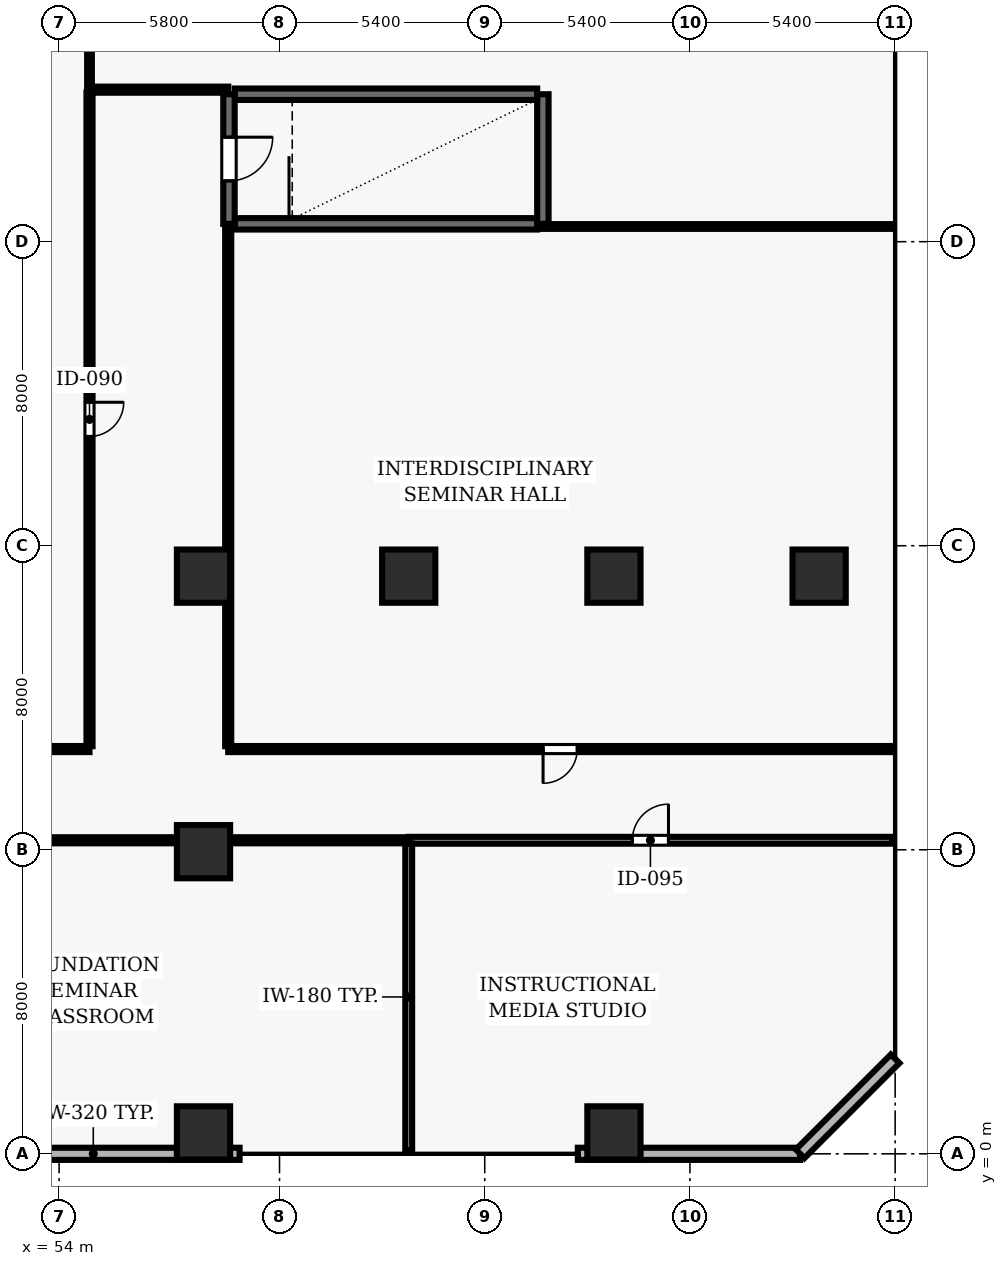
"""IFC4 building model, lengths in metres.
Left out: names, types, materials, properties, quantities, classifications, styles, units other than length and angle.
Written with IfcOpenShell. Run it as: python <this file> out.ifc"""

import sys

from ifc_helpers import new_model, si_unit, direction, frame, frame_2d, origin, origin_2d, place, context, subcontext, project, spatial, rectangle, extrude, element, fill, save


model = new_model("IFC4")
c1 = context("Model", 3, precision=1e-05, world=origin(), true_north=direction((0.0, 1.0)))
c2 = subcontext(c1, "Body", "Model", "MODEL_VIEW")
j1 = project(units=[si_unit("LENGTHUNIT", "METRE"), si_unit("PLANEANGLEUNIT", "RADIAN")], contexts=[c1])
p1 = place(None, origin())
s1 = spatial("IfcSite", under=j1, at=p1, CompositionType="ELEMENT")
p2 = place(p1, origin())
s2 = spatial("IfcBuilding", under=s1, at=p2, CompositionType="ELEMENT")
p3 = place(p2, frame((0.0, 0.0, 20.8)))
s3 = spatial("IfcBuildingStorey", under=s2, at=p3, CompositionType="ELEMENT", Elevation=20.8)
for number, where, z_axis, x_axis in (
    (1, (57.8, 0.55, 0.0), (0.0, 0.0, 1.0), (1.0, 0.0, 0.0)),
    (2, (57.8, 7.95, 0.0), (0.0, 0.0, 1.0), (1.0, 0.0, 0.0)),
    (3, (57.8, 15.2, 0.0), (0.0, 0.0, 1.0), (1.0, 0.0, 0.0)),
    (4, (63.2, 15.2, 0.0), (0.0, 0.0, 1.0), (1.0, 0.0, 0.0)),
    (5, (68.6, 0.55, 0.0), (0.0, 0.0, 1.0), (1.0, 0.0, 0.0)),
    (6, (68.6, 15.2, 0.0), (0.0, 0.0, 1.0), (1.0, 0.0, 0.0)),
    (7, (74.0, 15.2, 0.0), (0.0, 0.0, 1.0), (1.0, 0.0, 0.0)),
):
    element("IfcColumn", number, at=place(p3, frame(where, z_axis=z_axis, x_axis=x_axis)), inside=s3, PredefinedType="COLUMN", context=c2, shape_type="SweptSolid", body=[
        extrude(rectangle(XDim=1.4, YDim=1.4, at=origin_2d()), origin(), (0.0, 0.0, 1.0), 5.2),
    ])
p4 = place(p3, frame((51.05, 0.0, 0.0), z_axis=(0.0, 0.0, 1.0), x_axis=(1.0, 0.0, 0.0)))
e8 = element("IfcWall", 8, at=p4, inside=s3, PredefinedType="SOLIDWALL", context=c2, shape_type="SweptSolid", body=[
    extrude(rectangle(XDim=7.7, YDim=0.32, at=frame_2d((3.85, 0.0))), origin(), (0.0, 0.0, 1.0), 4.78),
])
p5 = place(p3, frame((67.65, 0.0, 0.0), z_axis=(0.0, 0.0, 1.0), x_axis=(1.0, 0.0, 0.0)))
e9 = element("IfcWall", 9, at=p5, inside=s3, PredefinedType="SOLIDWALL", context=c2, shape_type="SweptSolid", body=[
    extrude(rectangle(XDim=5.85, YDim=0.32, at=frame_2d((2.925, 0.0))), origin(), (0.0, 0.0, 1.0), 4.78),
])
p6 = place(p3, frame((73.5, 0.0, 0.0), z_axis=(0.0, 0.0, 1.0), x_axis=(0.707106781187, 0.707106781187, 0.0)))
e10 = element("IfcWall", 10, at=p6, inside=s3, PredefinedType="SOLIDWALL", context=c2, shape_type="SweptSolid", body=[
    extrude(rectangle(XDim=3.536, YDim=0.32, at=frame_2d((1.768, 0.0))), origin(), (0.0, 0.0, 1.0), 4.78),
])
p7 = place(p3, frame((58.62, 24.47, 0.0), z_axis=(0.0, 0.0, 1.0), x_axis=(1.0, 0.0, 0.0)))
e11 = element("IfcWall", 11, at=p7, inside=s3, PredefinedType="SHEAR", context=c2, shape_type="SweptSolid", body=[
    extrude(rectangle(XDim=7.96, YDim=0.3, at=frame_2d((3.98, 0.0))), origin(), (0.0, 0.0, 1.0), 4.78),
])
p8 = place(p3, frame((66.73, 24.47, 0.0), z_axis=(0.0, 0.0, 1.0), x_axis=(0.0, 1.0, 0.0)))
e12 = element("IfcWall", 12, at=p8, inside=s3, PredefinedType="SHEAR", context=c2, shape_type="SweptSolid", body=[
    extrude(rectangle(XDim=3.41, YDim=0.3, at=frame_2d((1.705, 0.0))), origin(), (0.0, 0.0, 1.0), 4.78),
])
p9 = place(p3, frame((66.58, 27.88, 0.0), z_axis=(0.0, 0.0, 1.0), x_axis=(-1.0, 0.0, 0.0)))
e13 = element("IfcWall", 13, at=p9, inside=s3, PredefinedType="SHEAR", context=c2, shape_type="SweptSolid", body=[
    extrude(rectangle(XDim=7.96, YDim=0.3, at=frame_2d((3.98, 0.0))), origin(), (0.0, 0.0, 1.0), 4.78),
])
p10 = place(p3, frame((58.47, 27.88, 0.0), z_axis=(0.0, 0.0, 1.0), x_axis=(0.0, -1.0, 0.0)))
e14 = element("IfcWall", 14, at=p10, inside=s3, PredefinedType="SHEAR", context=c2, shape_type="SweptSolid", body=[
    extrude(rectangle(XDim=3.41, YDim=0.3, at=frame_2d((1.705, 0.0))), origin(), (0.0, 0.0, 1.0), 4.78),
])
p11 = place(p10, frame((1.13, 0.0, 0.0)))
e15 = element("IfcOpeningElement", 15, at=p11, cuts=e14, PredefinedType="OPENING", context=c2, shape_type="SweptSolid", body=[
    extrude(rectangle(XDim=1.15, YDim=2.15, at=frame_2d((0.575, 1.075))), frame((0.0, 0.16, 0.0), z_axis=(0.0, -1.0, 0.0), x_axis=(1.0, 0.0, 0.0)), (0.0, 0.0, 1.0), 0.32),
])
p12 = place(p3, frame((38.05, 8.25, 0.0), z_axis=(0.0, 0.0, 1.0), x_axis=(1.0, 0.0, 0.0)))
e16 = element("IfcWall", 16, at=p12, inside=s3, PredefinedType="PARTITIONING", context=c2, shape_type="SweptSolid", body=[
    extrude(rectangle(XDim=25.15, YDim=0.16, at=frame_2d((12.575, 0.0))), origin(), (0.0, 0.0, 1.0), 3.768),
])
p13 = place(p12, frame((10.675, 0.0, 0.0)))
e17 = element("IfcOpeningElement", 17, at=p13, cuts=e16, PredefinedType="OPENING", context=c2, shape_type="SweptSolid", body=[
    extrude(rectangle(XDim=1.0, YDim=2.1, at=frame_2d((0.5, 1.05))), frame((0.0, 0.09, 0.0), z_axis=(0.0, -1.0, 0.0), x_axis=(1.0, 0.0, 0.0)), (0.0, 0.0, 1.0), 0.18),
])
p14 = place(p3, frame((54.8, 10.65, 0.0), z_axis=(0.0, 0.0, 1.0), x_axis=(-1.0, 0.0, 0.0)))
e18 = element("IfcWall", 18, at=p14, inside=s3, PredefinedType="PARTITIONING", context=c2, shape_type="SweptSolid", body=[
    extrude(rectangle(XDim=16.55, YDim=0.16, at=frame_2d((8.275, 0.0))), origin(), (0.0, 0.0, 1.0), 4.229),
])
p15 = place(p3, frame((58.45, 28.0, 0.0), z_axis=(0.0, 0.0, 1.0), x_axis=(-1.0, 0.0, 0.0)))
e19 = element("IfcWall", 19, at=p15, inside=s3, PredefinedType="PARTITIONING", context=c2, shape_type="SweptSolid", body=[
    extrude(rectangle(XDim=3.65, YDim=0.16, at=frame_2d((1.825, 0.0))), origin(), (0.0, 0.0, 1.0), 4.78),
])
p16 = place(p3, frame((63.2, 8.25, 0.0), z_axis=(0.0, 0.0, 1.0), x_axis=(1.0, 0.0, 0.0)))
e20 = element("IfcWall", 20, at=p16, inside=s3, PredefinedType="PARTITIONING", context=c2, shape_type="SweptSolid", body=[
    extrude(rectangle(XDim=12.72, YDim=0.18, at=frame_2d((6.36, 0.0))), origin(), (0.0, 0.0, 1.0), 4.78),
])
p17 = place(p16, frame((5.885, 0.0, 0.0)))
e21 = element("IfcOpeningElement", 21, at=p17, cuts=e20, PredefinedType="OPENING", context=c2, shape_type="SweptSolid", body=[
    extrude(rectangle(XDim=0.95, YDim=2.1, at=frame_2d((0.475, 1.05))), frame((0.0, 0.1, 0.0), z_axis=(0.0, -1.0, 0.0), x_axis=(1.0, 0.0, 0.0)), (0.0, 0.0, 1.0), 0.2),
])
p18 = place(p3, frame((75.92, 10.65, 0.0), z_axis=(0.0, 0.0, 1.0), x_axis=(-1.0, 0.0, 0.0)))
e22 = element("IfcWall", 22, at=p18, inside=s3, PredefinedType="PARTITIONING", context=c2, shape_type="SweptSolid", body=[
    extrude(rectangle(XDim=17.47, YDim=0.16, at=frame_2d((8.735, 0.0))), origin(), (0.0, 0.0, 1.0), 4.229),
])
p19 = place(p18, frame((8.285, 0.0, 0.0)))
e23 = element("IfcOpeningElement", 23, at=p19, cuts=e22, PredefinedType="OPENING", context=c2, shape_type="SweptSolid", body=[
    extrude(rectangle(XDim=0.9, YDim=2.1, at=frame_2d((0.45, 1.05))), frame((0.0, 0.09, 0.0), z_axis=(0.0, -1.0, 0.0), x_axis=(1.0, 0.0, 0.0)), (0.0, 0.0, 1.0), 0.18),
])
p20 = place(p3, frame((75.92, 24.4, 0.0), z_axis=(0.0, 0.0, 1.0), x_axis=(-1.0, 0.0, 0.0)))
e24 = element("IfcWall", 24, at=p20, inside=s3, PredefinedType="PARTITIONING", context=c2, shape_type="SweptSolid", body=[
    extrude(rectangle(XDim=9.34, YDim=0.125, at=frame_2d((4.67, 0.0))), origin(), (0.0, 0.0, 1.0), 4.78),
])
p21 = place(p3, frame((54.8, 28.075, 0.0), z_axis=(0.0, 0.0, 1.0), x_axis=(0.0, 1.0, 0.0)))
e25 = element("IfcWall", 25, at=p21, inside=s3, PredefinedType="PARTITIONING", context=c2, shape_type="SweptSolid", body=[
    extrude(rectangle(XDim=3.835, YDim=0.125, at=frame_2d((1.917, 0.0))), origin(), (0.0, 0.0, 1.0), 4.229),
])
p22 = place(p3, frame((54.8, 27.925, 0.0), z_axis=(0.0, 0.0, 1.0), x_axis=(0.0, -1.0, 0.0)))
e26 = element("IfcWall", 26, at=p22, inside=s3, PredefinedType="PARTITIONING", context=c2, shape_type="SweptSolid", body=[
    extrude(rectangle(XDim=17.2, YDim=0.16, at=frame_2d((8.6, 0.0))), origin(), (0.0, 0.0, 1.0), 4.229),
])
p23 = place(p22, frame((8.15, 0.0, 0.0)))
e27 = element("IfcOpeningElement", 27, at=p23, cuts=e26, PredefinedType="OPENING", context=c2, shape_type="SweptSolid", body=[
    extrude(rectangle(XDim=0.9, YDim=2.1, at=frame_2d((0.45, 1.05))), frame((0.0, 0.09, 0.0), z_axis=(0.0, -1.0, 0.0), x_axis=(1.0, 0.0, 0.0)), (0.0, 0.0, 1.0), 0.18),
])
p24 = place(p3, frame((58.45, 10.725, 0.0), z_axis=(0.0, 0.0, 1.0), x_axis=(0.0, 1.0, 0.0)))
e28 = element("IfcWall", 28, at=p24, inside=s3, PredefinedType="PARTITIONING", context=c2, shape_type="SweptSolid", body=[
    extrude(rectangle(XDim=13.675, YDim=0.16, at=frame_2d((6.837, 0.0))), origin(), (0.0, 0.0, 1.0), 4.78),
])
p25 = place(p3, frame((63.2, 0.09, 0.0), z_axis=(0.0, 0.0, 1.0), x_axis=(0.0, 1.0, 0.0)))
e29 = element("IfcWall", 29, at=p25, inside=s3, PredefinedType="PARTITIONING", context=c2, shape_type="SweptSolid", body=[
    extrude(rectangle(XDim=8.075, YDim=0.18, at=frame_2d((4.038, 0.0))), origin(), (0.0, 0.0, 1.0), 4.78),
])
p26 = place(p11, origin())
e30 = element("IfcDoor", 30, at=p26, inside=s3, OperationType="SINGLE_SWING_LEFT", PredefinedType="DOOR", context=c2, shape_type="SweptSolid", body=[
    extrude(rectangle(XDim=1.15, YDim=2.15, at=frame_2d((0.575, 1.075))), frame((0.0, 0.025, 0.0), z_axis=(0.0, -1.0, 0.0), x_axis=(1.0, 0.0, 0.0)), (0.0, 0.0, 1.0), 0.05),
])
fill(e15, e30)
p27 = place(p23, origin())
e31 = element("IfcDoor", 31, at=p27, inside=s3, OperationType="SINGLE_SWING_LEFT", PredefinedType="DOOR", context=c2, shape_type="SweptSolid", body=[
    extrude(rectangle(XDim=0.9, YDim=2.1, at=frame_2d((0.45, 1.05))), frame((0.0, 0.025, 0.0), z_axis=(0.0, -1.0, 0.0), x_axis=(1.0, 0.0, 0.0)), (0.0, 0.0, 1.0), 0.05),
])
fill(e27, e31)
p28 = place(p19, origin())
e32 = element("IfcDoor", 32, at=p28, inside=s3, OperationType="SINGLE_SWING_RIGHT", PredefinedType="DOOR", context=c2, shape_type="SweptSolid", body=[
    extrude(rectangle(XDim=0.9, YDim=2.1, at=frame_2d((0.45, 1.05))), frame((0.0, 0.025, 0.0), z_axis=(0.0, -1.0, 0.0), x_axis=(1.0, 0.0, 0.0)), (0.0, 0.0, 1.0), 0.05),
])
fill(e23, e32)
p29 = place(p17, origin())
e33 = element("IfcDoor", 33, at=p29, inside=s3, OperationType="SINGLE_SWING_RIGHT", PredefinedType="DOOR", context=c2, shape_type="SweptSolid", body=[
    extrude(rectangle(XDim=0.95, YDim=2.1, at=frame_2d((0.475, 1.05))), frame((0.0, 0.025, 0.0), z_axis=(0.0, -1.0, 0.0), x_axis=(1.0, 0.0, 0.0)), (0.0, 0.0, 1.0), 0.05),
])
fill(e21, e33)
save(model, sys.argv[1])
